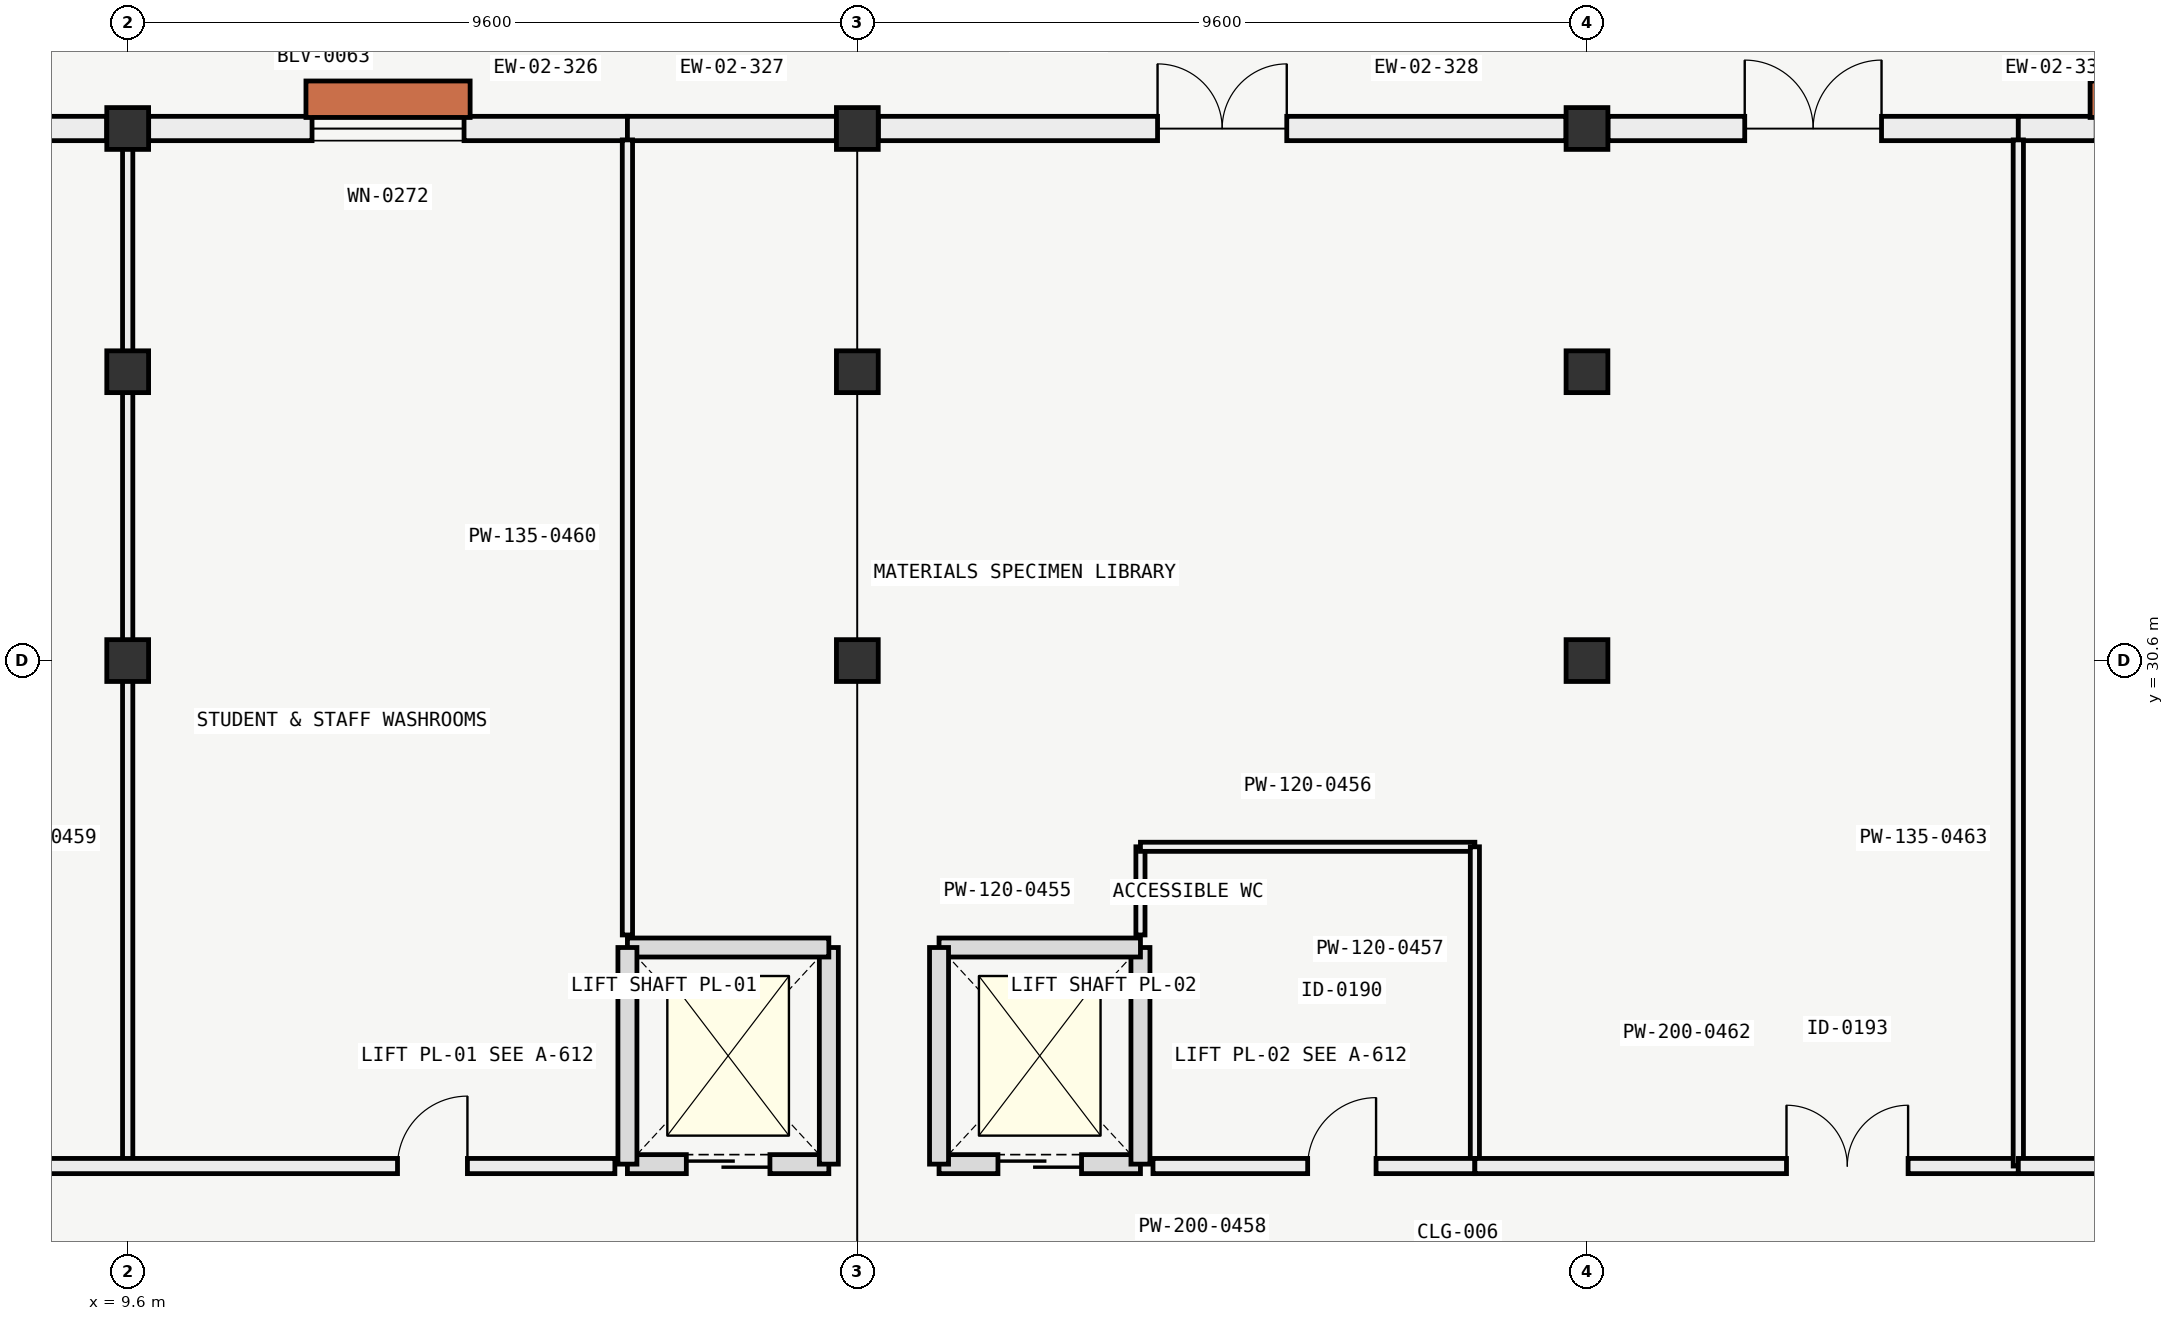
"""IFC4 building model, lengths in metres.
Left out: names, types, materials, properties, quantities, classifications, styles, units other than length and angle.
Written with IfcOpenShell. Run it as: python <this file> out.ifc"""

import sys

from ifc_helpers import new_model, si_unit, direction, frame, frame_2d, origin, origin_2d, place, context, subcontext, project, spatial, rectangle, extrude, element, fill, save


model = new_model("IFC4")
c1 = context("Model", 3, precision=1e-05, world=origin(), true_north=direction((0.0, 1.0)))
c2 = subcontext(c1, "Body", "Model", "MODEL_VIEW")
j1 = project(units=[si_unit("LENGTHUNIT", "METRE"), si_unit("PLANEANGLEUNIT", "RADIAN")], contexts=[c1])
p1 = place(None, origin())
s1 = spatial("IfcSite", under=j1, at=p1, CompositionType="ELEMENT")
p2 = place(p1, origin())
s2 = spatial("IfcBuilding", under=s1, at=p2, CompositionType="ELEMENT")
p3 = place(p2, frame((0.0, 0.0, 22.2)))
s3 = spatial("IfcBuildingStorey", under=s2, at=p3, CompositionType="ELEMENT", Elevation=22.2)
for number, where, z_axis, x_axis in (
    (1, (9.6, 30.6, 0.0), (0.0, 0.0, 1.0), (1.0, 0.0, 0.0)),
    (2, (9.6, 34.4, 0.0), (0.0, 0.0, 1.0), (1.0, 0.0, 0.0)),
    (3, (9.6, 37.6, 0.0), (0.0, 0.0, 1.0), (1.0, 0.0, 0.0)),
    (4, (19.2, 30.6, 0.0), (0.0, 0.0, 1.0), (1.0, 0.0, 0.0)),
    (5, (19.2, 34.4, 0.0), (0.0, 0.0, 1.0), (1.0, 0.0, 0.0)),
    (6, (19.2, 37.6, 0.0), (0.0, 0.0, 1.0), (1.0, 0.0, 0.0)),
    (7, (28.8, 30.6, 0.0), (0.0, 0.0, 1.0), (1.0, 0.0, 0.0)),
    (8, (28.8, 34.4, 0.0), (0.0, 0.0, 1.0), (1.0, 0.0, 0.0)),
    (9, (28.8, 37.6, 0.0), (0.0, 0.0, 1.0), (1.0, 0.0, 0.0)),
):
    element("IfcColumn", number, at=place(p3, frame(where, z_axis=z_axis, x_axis=x_axis)), inside=s3, PredefinedType="COLUMN", context=c2, shape_type="SweptSolid", body=[
        extrude(rectangle(XDim=0.55, YDim=0.55, at=origin_2d()), origin(), (0.0, 0.0, 1.0), 4.2),
    ])
p4 = place(p3, frame((0.276, 37.6, 0.0), z_axis=(0.0, 0.0, 1.0), x_axis=(1.0, 0.0, 0.0)))
e10 = element("IfcWall", 10, at=p4, inside=s3, PredefinedType="SOLIDWALL", context=c2, shape_type="SweptSolid", body=[
    extrude(rectangle(XDim=9.048, YDim=0.32, at=frame_2d((4.524, 0.0))), origin(), (0.0, 0.0, 1.0), 3.3),
])
p5 = place(p4, frame((3.524, 0.0, 0.85)))
e11 = element("IfcOpeningElement", 11, at=p5, cuts=e10, PredefinedType="OPENING", context=c2, shape_type="SweptSolid", body=[
    extrude(rectangle(XDim=2.0, YDim=1.35, at=frame_2d((1.0, 0.675))), frame((0.0, 0.17, 0.0), z_axis=(0.0, -1.0, 0.0), x_axis=(1.0, 0.0, 0.0)), (0.0, 0.0, 1.0), 0.34),
])
p6 = place(p3, frame((9.876, 37.6, 0.0), z_axis=(0.0, 0.0, 1.0), x_axis=(1.0, 0.0, 0.0)))
e12 = element("IfcWall", 12, at=p6, inside=s3, PredefinedType="SOLIDWALL", context=c2, shape_type="SweptSolid", body=[
    extrude(rectangle(XDim=6.299, YDim=0.32, at=frame_2d((3.149, 0.0))), origin(), (0.0, 0.0, 1.0), 3.3),
])
p7 = place(p6, frame((2.149, 0.0, 0.85)))
e13 = element("IfcOpeningElement", 13, at=p7, cuts=e12, PredefinedType="OPENING", context=c2, shape_type="SweptSolid", body=[
    extrude(rectangle(XDim=2.0, YDim=1.35, at=frame_2d((1.0, 0.675))), frame((0.0, 0.17, 0.0), z_axis=(0.0, -1.0, 0.0), x_axis=(1.0, 0.0, 0.0)), (0.0, 0.0, 1.0), 0.34),
])
p8 = place(p3, frame((16.175, 37.6, 0.0), z_axis=(0.0, 0.0, 1.0), x_axis=(1.0, 0.0, 0.0)))
e14 = element("IfcWall", 14, at=p8, inside=s3, PredefinedType="SOLIDWALL", context=c2, shape_type="SweptSolid", body=[
    extrude(rectangle(XDim=2.749, YDim=0.32, at=frame_2d((1.375, 0.0))), origin(), (0.0, 0.0, 1.0), 3.3),
])
p9 = place(p3, frame((19.476, 37.6, 0.0), z_axis=(0.0, 0.0, 1.0), x_axis=(1.0, 0.0, 0.0)))
e15 = element("IfcWall", 15, at=p9, inside=s3, PredefinedType="SOLIDWALL", context=c2, shape_type="SweptSolid", body=[
    extrude(rectangle(XDim=9.048, YDim=0.32, at=frame_2d((4.524, 0.0))), origin(), (0.0, 0.0, 1.0), 3.3),
])
p10 = place(p9, frame((3.674, 0.0, 0.0)))
e16 = element("IfcOpeningElement", 16, at=p10, cuts=e15, PredefinedType="OPENING", context=c2, shape_type="SweptSolid", body=[
    extrude(rectangle(XDim=1.7, YDim=2.15, at=frame_2d((0.85, 1.075))), frame((0.0, 0.17, 0.0), z_axis=(0.0, -1.0, 0.0), x_axis=(1.0, 0.0, 0.0)), (0.0, 0.0, 1.0), 0.34),
])
p11 = place(p3, frame((29.076, 37.6, 0.0), z_axis=(0.0, 0.0, 1.0), x_axis=(1.0, 0.0, 0.0)))
e17 = element("IfcWall", 17, at=p11, inside=s3, PredefinedType="SOLIDWALL", context=c2, shape_type="SweptSolid", body=[
    extrude(rectangle(XDim=5.399, YDim=0.32, at=frame_2d((2.7, 0.0))), origin(), (0.0, 0.0, 1.0), 3.3),
])
p12 = place(p11, frame((1.8, 0.0, 0.0)))
e18 = element("IfcOpeningElement", 18, at=p12, cuts=e17, PredefinedType="OPENING", context=c2, shape_type="SweptSolid", body=[
    extrude(rectangle(XDim=1.8, YDim=2.2, at=frame_2d((0.9, 1.1))), frame((0.0, 0.17, 0.0), z_axis=(0.0, -1.0, 0.0), x_axis=(1.0, 0.0, 0.0)), (0.0, 0.0, 1.0), 0.34),
])
p13 = place(p3, frame((34.475, 37.6, 0.0), z_axis=(0.0, 0.0, 1.0), x_axis=(1.0, 0.0, 0.0)))
e19 = element("IfcWall", 19, at=p13, inside=s3, PredefinedType="SOLIDWALL", context=c2, shape_type="SweptSolid", body=[
    extrude(rectangle(XDim=3.649, YDim=0.32, at=frame_2d((1.824, 0.0))), origin(), (0.0, 0.0, 1.0), 3.3),
])
p14 = place(p13, frame((1.024, 0.0, 0.85)))
e20 = element("IfcOpeningElement", 20, at=p14, cuts=e19, PredefinedType="OPENING", context=c2, shape_type="SweptSolid", body=[
    extrude(rectangle(XDim=1.6, YDim=1.9, at=frame_2d((0.8, 0.95))), frame((0.0, 0.17, 0.0), z_axis=(0.0, -1.0, 0.0), x_axis=(1.0, 0.0, 0.0)), (0.0, 0.0, 1.0), 0.34),
])
p15 = place(p3, frame((16.175, 23.975, 0.0), z_axis=(0.0, 0.0, 1.0), x_axis=(1.0, 0.0, 0.0)))
e21 = element("IfcWall", 21, at=p15, inside=s3, PredefinedType="SOLIDWALL", context=c2, shape_type="SweptSolid", body=[
    extrude(rectangle(XDim=2.65, YDim=0.25, at=frame_2d((1.325, 0.0))), origin(), (0.0, 0.0, 1.0), 3.975),
])
p16 = place(p15, frame((0.775, 0.0, 0.0)))
e22 = element("IfcOpeningElement", 22, at=p16, cuts=e21, PredefinedType="OPENING", context=c2, shape_type="SweptSolid", body=[
    extrude(rectangle(XDim=1.1, YDim=2.1, at=frame_2d((0.55, 1.05))), frame((0.0, 0.135, 0.0), z_axis=(0.0, -1.0, 0.0), x_axis=(1.0, 0.0, 0.0)), (0.0, 0.0, 1.0), 0.27),
])
p17 = place(p3, frame((18.825, 23.975, 0.0), z_axis=(0.0, 0.0, 1.0), x_axis=(0.0, 1.0, 0.0)))
e23 = element("IfcWall", 23, at=p17, inside=s3, PredefinedType="SOLIDWALL", context=c2, shape_type="SweptSolid", body=[
    extrude(rectangle(XDim=2.85, YDim=0.25, at=frame_2d((1.425, 0.0))), origin(), (0.0, 0.0, 1.0), 3.975),
])
p18 = place(p3, frame((18.825, 26.825, 0.0), z_axis=(0.0, 0.0, 1.0), x_axis=(-1.0, 0.0, 0.0)))
e24 = element("IfcWall", 24, at=p18, inside=s3, PredefinedType="SOLIDWALL", context=c2, shape_type="SweptSolid", body=[
    extrude(rectangle(XDim=2.65, YDim=0.25, at=frame_2d((1.325, 0.0))), origin(), (0.0, 0.0, 1.0), 3.975),
])
p19 = place(p3, frame((16.175, 26.825, 0.0), z_axis=(0.0, 0.0, 1.0), x_axis=(0.0, -1.0, 0.0)))
e25 = element("IfcWall", 25, at=p19, inside=s3, PredefinedType="SOLIDWALL", context=c2, shape_type="SweptSolid", body=[
    extrude(rectangle(XDim=2.85, YDim=0.25, at=frame_2d((1.425, 0.0))), origin(), (0.0, 0.0, 1.0), 3.975),
])
p20 = place(p3, frame((20.275, 23.975, 0.0), z_axis=(0.0, 0.0, 1.0), x_axis=(1.0, 0.0, 0.0)))
e26 = element("IfcWall", 26, at=p20, inside=s3, PredefinedType="SOLIDWALL", context=c2, shape_type="SweptSolid", body=[
    extrude(rectangle(XDim=2.65, YDim=0.25, at=frame_2d((1.325, 0.0))), origin(), (0.0, 0.0, 1.0), 3.975),
])
p21 = place(p20, frame((0.775, 0.0, 0.0)))
e27 = element("IfcOpeningElement", 27, at=p21, cuts=e26, PredefinedType="OPENING", context=c2, shape_type="SweptSolid", body=[
    extrude(rectangle(XDim=1.1, YDim=2.1, at=frame_2d((0.55, 1.05))), frame((0.0, 0.135, 0.0), z_axis=(0.0, -1.0, 0.0), x_axis=(1.0, 0.0, 0.0)), (0.0, 0.0, 1.0), 0.27),
])
p22 = place(p3, frame((22.925, 23.975, 0.0), z_axis=(0.0, 0.0, 1.0), x_axis=(0.0, 1.0, 0.0)))
e28 = element("IfcWall", 28, at=p22, inside=s3, PredefinedType="SOLIDWALL", context=c2, shape_type="SweptSolid", body=[
    extrude(rectangle(XDim=2.85, YDim=0.25, at=frame_2d((1.425, 0.0))), origin(), (0.0, 0.0, 1.0), 3.975),
])
p23 = place(p3, frame((22.925, 26.825, 0.0), z_axis=(0.0, 0.0, 1.0), x_axis=(-1.0, 0.0, 0.0)))
e29 = element("IfcWall", 29, at=p23, inside=s3, PredefinedType="SOLIDWALL", context=c2, shape_type="SweptSolid", body=[
    extrude(rectangle(XDim=2.65, YDim=0.25, at=frame_2d((1.325, 0.0))), origin(), (0.0, 0.0, 1.0), 3.975),
])
p24 = place(p3, frame((20.275, 26.825, 0.0), z_axis=(0.0, 0.0, 1.0), x_axis=(0.0, -1.0, 0.0)))
e30 = element("IfcWall", 30, at=p24, inside=s3, PredefinedType="SOLIDWALL", context=c2, shape_type="SweptSolid", body=[
    extrude(rectangle(XDim=2.85, YDim=0.25, at=frame_2d((1.425, 0.0))), origin(), (0.0, 0.0, 1.0), 3.975),
])
p25 = place(p3, frame((22.925, 26.99, 0.0), z_axis=(0.0, 0.0, 1.0), x_axis=(0.0, 1.0, 0.0)))
e31 = element("IfcWall", 31, at=p25, inside=s3, PredefinedType="PARTITIONING", context=c2, shape_type="SweptSolid", body=[
    extrude(rectangle(XDim=1.16, YDim=0.12, at=frame_2d((0.58, 0.0))), origin(), (0.0, 0.0, 1.0), 3.85),
])
p26 = place(p3, frame((22.925, 28.15, 0.0), z_axis=(0.0, 0.0, 1.0), x_axis=(1.0, 0.0, 0.0)))
e32 = element("IfcWall", 32, at=p26, inside=s3, PredefinedType="PARTITIONING", context=c2, shape_type="SweptSolid", body=[
    extrude(rectangle(XDim=4.4, YDim=0.12, at=frame_2d((2.2, 0.0))), origin(), (0.0, 0.0, 1.0), 3.85),
])
p27 = place(p3, frame((27.325, 23.95, 0.0), z_axis=(0.0, 0.0, 1.0), x_axis=(0.0, 1.0, 0.0)))
e33 = element("IfcWall", 33, at=p27, inside=s3, PredefinedType="PARTITIONING", context=c2, shape_type="SweptSolid", body=[
    extrude(rectangle(XDim=4.2, YDim=0.12, at=frame_2d((2.1, 0.0))), origin(), (0.0, 0.0, 1.0), 3.85),
])
p28 = place(p3, frame((23.09, 23.95, 0.0), z_axis=(0.0, 0.0, 1.0), x_axis=(1.0, 0.0, 0.0)))
e34 = element("IfcWall", 34, at=p28, inside=s3, PredefinedType="PARTITIONING", context=c2, shape_type="SweptSolid", body=[
    extrude(rectangle(XDim=4.235, YDim=0.2, at=frame_2d((2.117, 0.0))), origin(), (0.0, 0.0, 1.0), 3.85),
])
p29 = place(p28, frame((2.035, 0.0, 0.0)))
e35 = element("IfcOpeningElement", 35, at=p29, cuts=e34, PredefinedType="OPENING", context=c2, shape_type="SweptSolid", body=[
    extrude(rectangle(XDim=0.9, YDim=2.05, at=frame_2d((0.45, 1.025))), frame((0.0, 0.11, 0.0), z_axis=(0.0, -1.0, 0.0), x_axis=(1.0, 0.0, 0.0)), (0.0, 0.0, 1.0), 0.22),
])
p30 = place(p3, frame((9.6, 23.95, 0.0), z_axis=(0.0, 0.0, 1.0), x_axis=(0.0, 1.0, 0.0)))
e36 = element("IfcWall", 36, at=p30, inside=s3, PredefinedType="PARTITIONING", context=c2, shape_type="SweptSolid", body=[
    extrude(rectangle(XDim=13.5, YDim=0.135, at=frame_2d((6.75, 0.0))), origin(), (0.0, 0.0, 1.0), 3.305),
])
p31 = place(p3, frame((16.175, 26.99, 0.0), z_axis=(0.0, 0.0, 1.0), x_axis=(0.0, 1.0, 0.0)))
e37 = element("IfcWall", 37, at=p31, inside=s3, PredefinedType="PARTITIONING", context=c2, shape_type="SweptSolid", body=[
    extrude(rectangle(XDim=10.46, YDim=0.135, at=frame_2d((5.23, 0.0))), origin(), (0.0, 0.0, 1.0), 3.405),
])
p32 = place(p3, frame((0.15, 23.95, 0.0), z_axis=(0.0, 0.0, 1.0), x_axis=(1.0, 0.0, 0.0)))
e38 = element("IfcWall", 38, at=p32, inside=s3, PredefinedType="PARTITIONING", context=c2, shape_type="SweptSolid", body=[
    extrude(rectangle(XDim=15.86, YDim=0.2, at=frame_2d((7.93, 0.0))), origin(), (0.0, 0.0, 1.0), 3.305),
])
p33 = place(p32, frame((6.05, 0.0, 0.0)))
e39 = element("IfcOpeningElement", 39, at=p33, cuts=e38, PredefinedType="OPENING", context=c2, shape_type="SweptSolid", body=[
    extrude(rectangle(XDim=1.6, YDim=2.25, at=frame_2d((0.8, 1.125))), frame((0.0, 0.11, 0.0), z_axis=(0.0, -1.0, 0.0), x_axis=(1.0, 0.0, 0.0)), (0.0, 0.0, 1.0), 0.22),
])
p34 = place(p32, frame((13.0, 0.0, 0.0)))
e40 = element("IfcOpeningElement", 40, at=p34, cuts=e38, PredefinedType="OPENING", context=c2, shape_type="SweptSolid", body=[
    extrude(rectangle(XDim=0.92, YDim=2.1, at=frame_2d((0.46, 1.05))), frame((0.0, 0.11, 0.0), z_axis=(0.0, -1.0, 0.0), x_axis=(1.0, 0.0, 0.0)), (0.0, 0.0, 1.0), 0.22),
])
p35 = place(p3, frame((27.325, 23.95, 0.0), z_axis=(0.0, 0.0, 1.0), x_axis=(1.0, 0.0, 0.0)))
e41 = element("IfcWall", 41, at=p35, inside=s3, PredefinedType="PARTITIONING", context=c2, shape_type="SweptSolid", body=[
    extrude(rectangle(XDim=7.15, YDim=0.2, at=frame_2d((3.575, 0.0))), origin(), (0.0, 0.0, 1.0), 3.305),
])
p36 = place(p35, frame((4.1, 0.0, 0.0)))
e42 = element("IfcOpeningElement", 42, at=p36, cuts=e41, PredefinedType="OPENING", context=c2, shape_type="SweptSolid", body=[
    extrude(rectangle(XDim=1.6, YDim=2.25, at=frame_2d((0.8, 1.125))), frame((0.0, 0.11, 0.0), z_axis=(0.0, -1.0, 0.0), x_axis=(1.0, 0.0, 0.0)), (0.0, 0.0, 1.0), 0.22),
])
p37 = place(p3, frame((34.475, 23.95, 0.0), z_axis=(0.0, 0.0, 1.0), x_axis=(0.0, 1.0, 0.0)))
e43 = element("IfcWall", 43, at=p37, inside=s3, PredefinedType="PARTITIONING", context=c2, shape_type="SweptSolid", body=[
    extrude(rectangle(XDim=13.5, YDim=0.135, at=frame_2d((6.75, 0.0))), origin(), (0.0, 0.0, 1.0), 3.405),
])
p38 = place(p3, frame((34.475, 23.95, 0.0), z_axis=(0.0, 0.0, 1.0), x_axis=(1.0, 0.0, 0.0)))
e44 = element("IfcWall", 44, at=p38, inside=s3, PredefinedType="PARTITIONING", context=c2, shape_type="SweptSolid", body=[
    extrude(rectangle(XDim=10.175, YDim=0.2, at=frame_2d((5.087, 0.0))), origin(), (0.0, 0.0, 1.0), 3.305),
])
p39 = place(p38, frame((2.1, 0.0, 0.0)))
e45 = element("IfcOpeningElement", 45, at=p39, cuts=e44, PredefinedType="OPENING", context=c2, shape_type="SweptSolid", body=[
    extrude(rectangle(XDim=0.92, YDim=2.1, at=frame_2d((0.46, 1.05))), frame((0.0, 0.11, 0.0), z_axis=(0.0, -1.0, 0.0), x_axis=(1.0, 0.0, 0.0)), (0.0, 0.0, 1.0), 0.22),
])
p40 = place(p7, origin())
e46 = element("IfcWindow", 46, at=p40, inside=s3, PartitioningType="SINGLE_PANEL", PredefinedType="WINDOW", context=c2, shape_type="SweptSolid", body=[
    extrude(rectangle(XDim=2.0, YDim=1.35, at=frame_2d((1.0, 0.675))), frame((0.0, 0.03, 0.0), z_axis=(0.0, -1.0, 0.0), x_axis=(1.0, 0.0, 0.0)), (0.0, 0.0, 1.0), 0.06),
])
fill(e13, e46)
p41 = place(p10, origin())
e47 = element("IfcDoor", 47, at=p41, inside=s3, OperationType="DOUBLE_DOOR_SINGLE_SWING", PredefinedType="DOOR", context=c2, shape_type="SweptSolid", body=[
    extrude(rectangle(XDim=1.7, YDim=2.15, at=frame_2d((0.85, 1.075))), frame((0.0, 0.025, 0.0), z_axis=(0.0, -1.0, 0.0), x_axis=(1.0, 0.0, 0.0)), (0.0, 0.0, 1.0), 0.05),
])
fill(e16, e47)
p42 = place(p12, origin())
e48 = element("IfcDoor", 48, at=p42, inside=s3, OperationType="DOUBLE_DOOR_SINGLE_SWING", PredefinedType="DOOR", context=c2, shape_type="SweptSolid", body=[
    extrude(rectangle(XDim=1.8, YDim=2.2, at=frame_2d((0.9, 1.1))), frame((0.0, 0.025, 0.0), z_axis=(0.0, -1.0, 0.0), x_axis=(1.0, 0.0, 0.0)), (0.0, 0.0, 1.0), 0.05),
])
fill(e18, e48)
p43 = place(p16, origin())
e49 = element("IfcDoor", 49, at=p43, inside=s3, OperationType="SLIDING_TO_LEFT", PredefinedType="DOOR", context=c2, shape_type="SweptSolid", body=[
    extrude(rectangle(XDim=1.1, YDim=2.1, at=frame_2d((0.55, 1.05))), frame((0.0, 0.025, 0.0), z_axis=(0.0, -1.0, 0.0), x_axis=(1.0, 0.0, 0.0)), (0.0, 0.0, 1.0), 0.05),
])
fill(e22, e49)
p44 = place(p21, origin())
e50 = element("IfcDoor", 50, at=p44, inside=s3, OperationType="SLIDING_TO_LEFT", PredefinedType="DOOR", context=c2, shape_type="SweptSolid", body=[
    extrude(rectangle(XDim=1.1, YDim=2.1, at=frame_2d((0.55, 1.05))), frame((0.0, 0.025, 0.0), z_axis=(0.0, -1.0, 0.0), x_axis=(1.0, 0.0, 0.0)), (0.0, 0.0, 1.0), 0.05),
])
fill(e27, e50)
p45 = place(p29, origin())
e51 = element("IfcDoor", 51, at=p45, inside=s3, OperationType="SINGLE_SWING_RIGHT", PredefinedType="DOOR", context=c2, shape_type="SweptSolid", body=[
    extrude(rectangle(XDim=0.9, YDim=2.05, at=frame_2d((0.45, 1.025))), frame((0.0, 0.025, 0.0), z_axis=(0.0, -1.0, 0.0), x_axis=(1.0, 0.0, 0.0)), (0.0, 0.0, 1.0), 0.05),
])
fill(e35, e51)
p46 = place(p34, origin())
e52 = element("IfcDoor", 52, at=p46, inside=s3, OperationType="SINGLE_SWING_RIGHT", PredefinedType="DOOR", context=c2, shape_type="SweptSolid", body=[
    extrude(rectangle(XDim=0.92, YDim=2.1, at=frame_2d((0.46, 1.05))), frame((0.0, 0.025, 0.0), z_axis=(0.0, -1.0, 0.0), x_axis=(1.0, 0.0, 0.0)), (0.0, 0.0, 1.0), 0.05),
])
fill(e40, e52)
p47 = place(p36, origin())
e53 = element("IfcDoor", 53, at=p47, inside=s3, OperationType="DOUBLE_DOOR_SINGLE_SWING", PredefinedType="DOOR", context=c2, shape_type="SweptSolid", body=[
    extrude(rectangle(XDim=1.6, YDim=2.25, at=frame_2d((0.8, 1.125))), frame((0.0, 0.025, 0.0), z_axis=(0.0, -1.0, 0.0), x_axis=(1.0, 0.0, 0.0)), (0.0, 0.0, 1.0), 0.05),
])
fill(e42, e53)
save(model, sys.argv[1])
